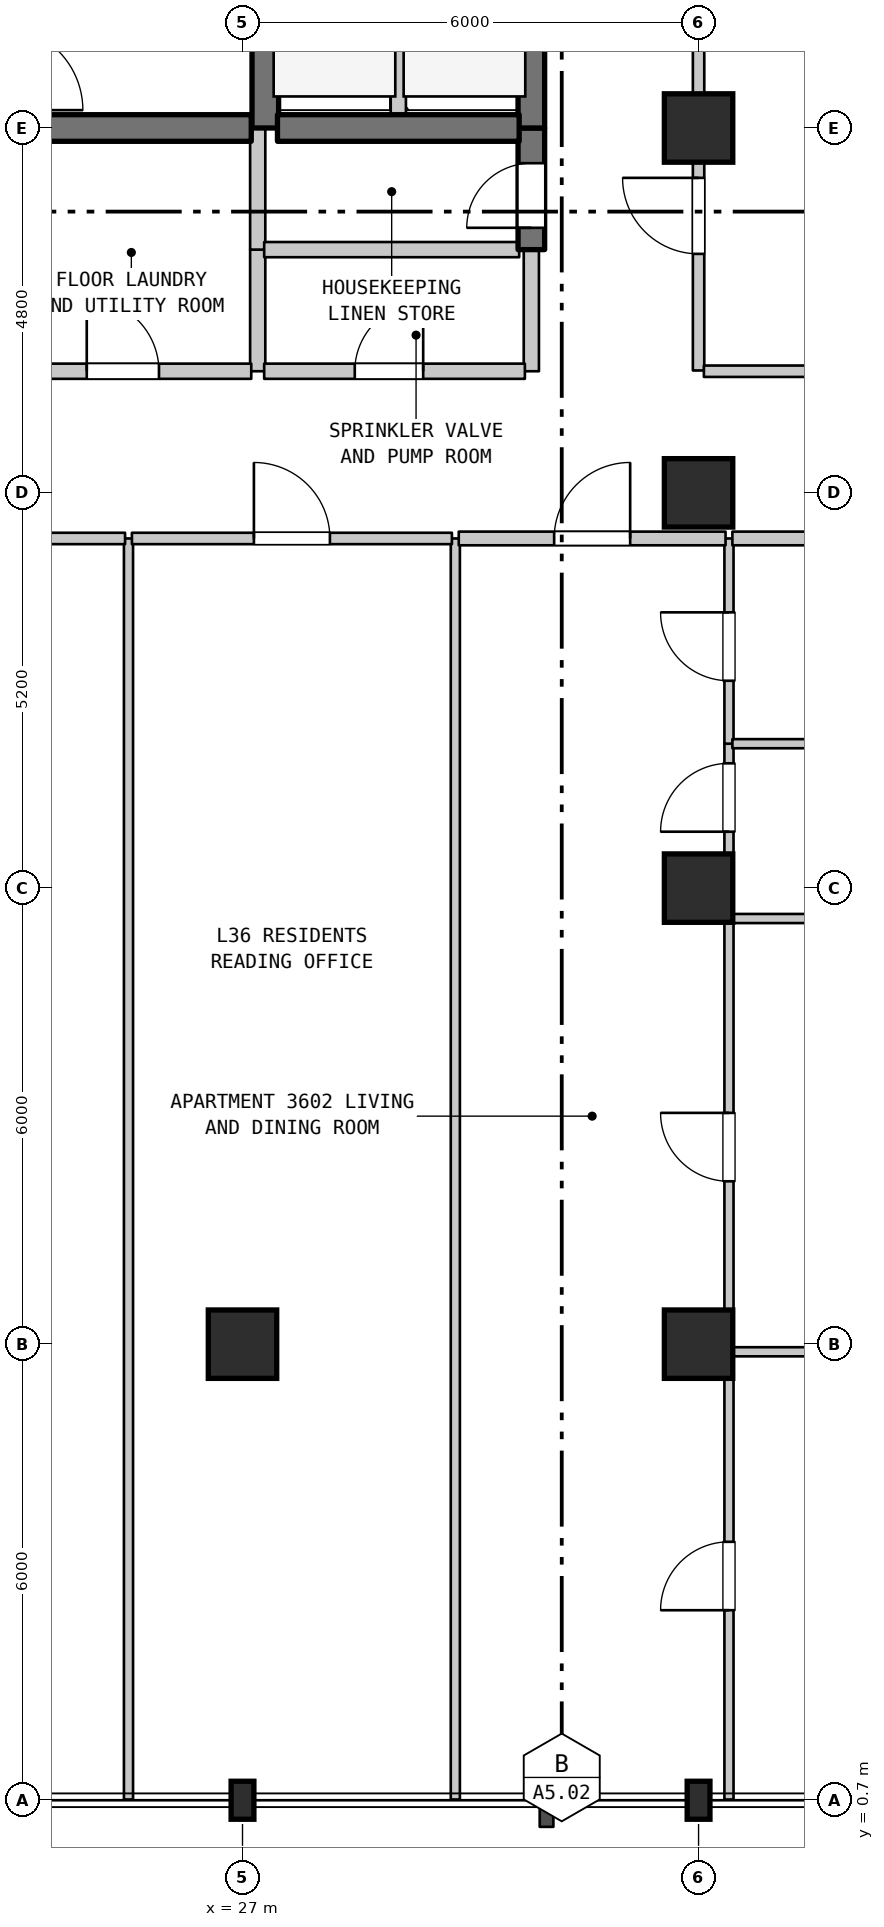
"""IFC4 building model, lengths in metres.
Left out: names, types, materials, properties, quantities, classifications, styles, units other than length and angle.
Written with IfcOpenShell. Run it as: python <this file> out.ifc"""

import sys

from ifc_helpers import new_model, si_unit, direction, frame, frame_2d, origin, origin_2d, place, context, subcontext, project, spatial, rectangle, i_section, extrude, element, fill, save


model = new_model("IFC4")
c1 = context("Model", 3, precision=1e-05, world=origin(), true_north=direction((0.0, 1.0)))
c2 = subcontext(c1, "Body", "Model", "MODEL_VIEW")
j1 = project(units=[si_unit("LENGTHUNIT", "METRE"), si_unit("PLANEANGLEUNIT", "RADIAN")], contexts=[c1])
p1 = place(None, origin())
s1 = spatial("IfcSite", under=j1, at=p1, CompositionType="ELEMENT")
p2 = place(p1, origin())
s2 = spatial("IfcBuilding", under=s1, at=p2, CompositionType="ELEMENT")
p3 = place(p2, frame((0.0, 0.0, 148.3)))
s3 = spatial("IfcBuildingStorey", under=s2, at=p3, CompositionType="ELEMENT", Elevation=148.3)
p4 = place(p3, frame((27.0, 0.7, 0.0), z_axis=(0.0, 0.0, 1.0), x_axis=(1.0, 0.0, 0.0)))
e1 = element("IfcColumn", 1, at=p4, inside=s3, PredefinedType="COLUMN", context=c2, shape_type="SweptSolid", body=[
    extrude(i_section(OverallWidth=0.3, OverallDepth=0.5, WebThickness=0.014, FlangeThickness=0.028, FilletRadius=0.027, at=origin_2d()), origin(), (0.0, 0.0, 1.0), 3.7),
])
p5 = place(p3, frame((27.0, 6.7, 0.0), z_axis=(0.0, 0.0, 1.0), x_axis=(1.0, 0.0, 0.0)))
e2 = element("IfcColumn", 2, at=p5, inside=s3, PredefinedType="COLUMN", context=c2, shape_type="SweptSolid", body=[
    extrude(rectangle(XDim=0.9, YDim=0.9, at=origin_2d()), origin(), (0.0, 0.0, 1.0), 3.7),
])
p6 = place(p3, frame((33.0, 0.7, 0.0), z_axis=(0.0, 0.0, 1.0), x_axis=(1.0, 0.0, 0.0)))
e3 = element("IfcColumn", 3, at=p6, inside=s3, PredefinedType="COLUMN", context=c2, shape_type="SweptSolid", body=[
    extrude(i_section(OverallWidth=0.3, OverallDepth=0.5, WebThickness=0.014, FlangeThickness=0.028, FilletRadius=0.027, at=origin_2d()), origin(), (0.0, 0.0, 1.0), 3.7),
])
for number, where, z_axis, x_axis in (
    (4, (33.0, 6.7, 0.0), (0.0, 0.0, 1.0), (1.0, 0.0, 0.0)),
    (5, (33.0, 12.7, 0.0), (0.0, 0.0, 1.0), (1.0, 0.0, 0.0)),
    (6, (33.0, 17.9, 0.0), (0.0, 0.0, 1.0), (1.0, 0.0, 0.0)),
    (7, (33.0, 22.7, 0.0), (0.0, 0.0, 1.0), (1.0, 0.0, 0.0)),
):
    element("IfcColumn", number, at=place(p3, frame(where, z_axis=z_axis, x_axis=x_axis)), inside=s3, PredefinedType="COLUMN", context=c2, shape_type="SweptSolid", body=[
        extrude(rectangle(XDim=0.9, YDim=0.9, at=origin_2d()), origin(), (0.0, 0.0, 1.0), 3.7),
    ])
p7 = place(p3, frame((25.5, 0.71, 0.0), z_axis=(0.0, 0.0, 1.0), x_axis=(0.0, 1.0, 0.0)))
e8 = element("IfcWall", 8, at=p7, inside=s3, PredefinedType="PARTITIONING", context=c2, shape_type="SweptSolid", body=[
    extrude(rectangle(XDim=16.59, YDim=0.12, at=frame_2d((8.295, 0.0))), origin(), (0.0, 0.0, 1.0), 3.385),
])
p8 = place(p3, frame((27.2, 19.5, 0.0), z_axis=(0.0, 0.0, 1.0), x_axis=(0.0, 1.0, 0.0)))
e9 = element("IfcWall", 9, at=p8, inside=s3, PredefinedType="STANDARD", context=c2, shape_type="SweptSolid", body=[
    extrude(rectangle(XDim=1.6, YDim=0.2, at=frame_2d((0.8, 0.0))), origin(), (0.0, 0.0, 1.0), 3.385),
])
p9 = place(p3, frame((27.2, 21.1, 0.0), z_axis=(0.0, 0.0, 1.0), x_axis=(0.0, 1.0, 0.0)))
e10 = element("IfcWall", 10, at=p9, inside=s3, PredefinedType="STANDARD", context=c2, shape_type="SweptSolid", body=[
    extrude(rectangle(XDim=1.6, YDim=0.2, at=frame_2d((0.8, 0.0))), origin(), (0.0, 0.0, 1.0), 3.385),
])
p10 = place(p3, frame((27.3, 22.7, 0.0), z_axis=(0.0, 0.0, 1.0), x_axis=(0.0, 1.0, 0.0)))
e11 = element("IfcWall", 11, at=p10, inside=s3, PredefinedType="SHEAR", context=c2, shape_type="SweptSolid", body=[
    extrude(rectangle(XDim=2.9, YDim=0.35, at=frame_2d((1.45, 0.0))), origin(), (0.0, 0.0, 1.0), 3.385),
])
p11 = place(p3, frame((29.05, 22.7, 0.0), z_axis=(0.0, 0.0, 1.0), x_axis=(0.0, 1.0, 0.0)))
e12 = element("IfcWall", 12, at=p11, inside=s3, PredefinedType="STANDARD", context=c2, shape_type="SweptSolid", body=[
    extrude(rectangle(XDim=2.9, YDim=0.2, at=frame_2d((1.45, 0.0))), origin(), (0.0, 0.0, 1.0), 3.385),
])
p12 = place(p3, frame((29.8, 0.71, 0.0), z_axis=(0.0, 0.0, 1.0), x_axis=(0.0, 1.0, 0.0)))
e13 = element("IfcWall", 13, at=p12, inside=s3, PredefinedType="PARTITIONING", context=c2, shape_type="SweptSolid", body=[
    extrude(rectangle(XDim=16.59, YDim=0.12, at=frame_2d((8.295, 0.0))), origin(), (0.0, 0.0, 1.0), 3.385),
])
p13 = place(p3, frame((30.8, 19.5, 0.0), z_axis=(0.0, 0.0, 1.0), x_axis=(0.0, 1.0, 0.0)))
e14 = element("IfcWall", 14, at=p13, inside=s3, PredefinedType="STANDARD", context=c2, shape_type="SweptSolid", body=[
    extrude(rectangle(XDim=1.6, YDim=0.2, at=frame_2d((0.8, 0.0))), origin(), (0.0, 0.0, 1.0), 3.385),
])
p14 = place(p3, frame((30.8, 21.1, 0.0), z_axis=(0.0, 0.0, 1.0), x_axis=(0.0, 1.0, 0.0)))
e15 = element("IfcWall", 15, at=p14, inside=s3, PredefinedType="SHEAR", context=c2, shape_type="SweptSolid", body=[
    extrude(rectangle(XDim=1.6, YDim=0.35, at=frame_2d((0.8, 0.0))), origin(), (0.0, 0.0, 1.0), 3.385),
])
p15 = place(p14, frame((0.287, 0.0, 0.0)))
e16 = element("IfcOpeningElement", 16, at=p15, cuts=e15, PredefinedType="OPENING", context=c2, shape_type="SweptSolid", body=[
    extrude(rectangle(XDim=0.85, YDim=2.1, at=frame_2d((0.425, 1.05))), frame((0.0, 0.185, 0.0), z_axis=(0.0, -1.0, 0.0), x_axis=(1.0, 0.0, 0.0)), (0.0, 0.0, 1.0), 0.37),
])
p16 = place(p3, frame((30.8, 22.7, 0.0), z_axis=(0.0, 0.0, 1.0), x_axis=(0.0, 1.0, 0.0)))
e17 = element("IfcWall", 17, at=p16, inside=s3, PredefinedType="SHEAR", context=c2, shape_type="SweptSolid", body=[
    extrude(rectangle(XDim=2.9, YDim=0.35, at=frame_2d((1.45, 0.0))), origin(), (0.0, 0.0, 1.0), 3.385),
])
p17 = place(p3, frame((33.0, 19.51, 0.0), z_axis=(0.0, 0.0, 1.0), x_axis=(0.0, 1.0, 0.0)))
e18 = element("IfcWall", 18, at=p17, inside=s3, PredefinedType="STANDARD", context=c2, shape_type="SweptSolid", body=[
    extrude(rectangle(XDim=5.35, YDim=0.15, at=frame_2d((2.675, 0.0))), origin(), (0.0, 0.0, 1.0), 2.935),
])
p18 = place(p17, frame((1.534, 0.0, 0.0)))
e19 = element("IfcOpeningElement", 19, at=p18, cuts=e18, PredefinedType="OPENING", context=c2, shape_type="SweptSolid", body=[
    extrude(rectangle(XDim=1.0, YDim=2.15, at=frame_2d((0.5, 1.075))), frame((0.0, 0.085, 0.0), z_axis=(0.0, -1.0, 0.0), x_axis=(1.0, 0.0, 0.0)), (0.0, 0.0, 1.0), 0.17),
])
p19 = place(p3, frame((33.4, 0.71, 0.0), z_axis=(0.0, 0.0, 1.0), x_axis=(0.0, 1.0, 0.0)))
e20 = element("IfcWall", 20, at=p19, inside=s3, PredefinedType="PARTITIONING", context=c2, shape_type="SweptSolid", body=[
    extrude(rectangle(XDim=11.59, YDim=0.12, at=frame_2d((5.795, 0.0))), origin(), (0.0, 0.0, 1.0), 3.385),
])
p20 = place(p19, frame((2.49, 0.0, 0.0)))
e21 = element("IfcOpeningElement", 21, at=p20, cuts=e20, PredefinedType="OPENING", context=c2, shape_type="SweptSolid", body=[
    extrude(rectangle(XDim=0.9, YDim=2.15, at=frame_2d((0.45, 1.075))), frame((0.0, 0.07, 0.0), z_axis=(0.0, -1.0, 0.0), x_axis=(1.0, 0.0, 0.0)), (0.0, 0.0, 1.0), 0.14),
])
p21 = place(p19, frame((8.133, 0.0, 0.0)))
e22 = element("IfcOpeningElement", 22, at=p21, cuts=e20, PredefinedType="OPENING", context=c2, shape_type="SweptSolid", body=[
    extrude(rectangle(XDim=0.9, YDim=2.15, at=frame_2d((0.45, 1.075))), frame((0.0, 0.07, 0.0), z_axis=(0.0, -1.0, 0.0), x_axis=(1.0, 0.0, 0.0)), (0.0, 0.0, 1.0), 0.14),
])
p22 = place(p3, frame((33.4, 12.3, 0.0), z_axis=(0.0, 0.0, 1.0), x_axis=(0.0, 1.0, 0.0)))
e23 = element("IfcWall", 23, at=p22, inside=s3, PredefinedType="PARTITIONING", context=c2, shape_type="SweptSolid", body=[
    extrude(rectangle(XDim=2.3, YDim=0.12, at=frame_2d((1.15, 0.0))), origin(), (0.0, 0.0, 1.0), 3.385),
])
p23 = place(p22, frame((1.142, 0.0, 0.0)))
e24 = element("IfcOpeningElement", 24, at=p23, cuts=e23, PredefinedType="OPENING", context=c2, shape_type="SweptSolid", body=[
    extrude(rectangle(XDim=0.9, YDim=2.15, at=frame_2d((0.45, 1.075))), frame((0.0, 0.07, 0.0), z_axis=(0.0, -1.0, 0.0), x_axis=(1.0, 0.0, 0.0)), (0.0, 0.0, 1.0), 0.14),
])
p24 = place(p3, frame((33.4, 14.6, 0.0), z_axis=(0.0, 0.0, 1.0), x_axis=(0.0, 1.0, 0.0)))
e25 = element("IfcWall", 25, at=p24, inside=s3, PredefinedType="PARTITIONING", context=c2, shape_type="SweptSolid", body=[
    extrude(rectangle(XDim=2.7, YDim=0.12, at=frame_2d((1.35, 0.0))), origin(), (0.0, 0.0, 1.0), 3.385),
])
p25 = place(p24, frame((0.828, 0.0, 0.0)))
e26 = element("IfcOpeningElement", 26, at=p25, cuts=e25, PredefinedType="OPENING", context=c2, shape_type="SweptSolid", body=[
    extrude(rectangle(XDim=0.9, YDim=2.1, at=frame_2d((0.45, 1.05))), frame((0.0, 0.07, 0.0), z_axis=(0.0, -1.0, 0.0), x_axis=(1.0, 0.0, 0.0)), (0.0, 0.0, 1.0), 0.14),
])
p26 = place(p3, frame((33.445, 6.6, 0.0), z_axis=(0.0, 0.0, 1.0), x_axis=(1.0, 0.0, 0.0)))
e27 = element("IfcWall", 27, at=p26, inside=s3, PredefinedType="PARTITIONING", context=c2, shape_type="SweptSolid", body=[
    extrude(rectangle(XDim=4.69, YDim=0.12, at=frame_2d((2.345, 0.0))), origin(), (0.0, 0.0, 1.0), 2.935),
])
for number, where, z_axis, x_axis in (
    (28, (33.445, 12.3, 0.0), (0.0, 0.0, 1.0), (1.0, 0.0, 0.0)),
    (29, (33.445, 14.6, 0.0), (0.0, 0.0, 1.0), (1.0, 0.0, 0.0)),
):
    element("IfcWall", number, at=place(p3, frame(where, z_axis=z_axis, x_axis=x_axis)), inside=s3, PredefinedType="PARTITIONING", context=c2, shape_type="SweptSolid", body=[
        extrude(rectangle(XDim=4.69, YDim=0.12, at=frame_2d((2.345, 0.0))), origin(), (0.0, 0.0, 1.0), 3.385),
    ])
p27 = place(p3, frame((20.545, 17.3, 0.0), z_axis=(0.0, 0.0, 1.0), x_axis=(1.0, 0.0, 0.0)))
e30 = element("IfcWall", 30, at=p27, inside=s3, PredefinedType="STANDARD", context=c2, shape_type="SweptSolid", body=[
    extrude(rectangle(XDim=4.91, YDim=0.15, at=frame_2d((2.455, 0.0))), origin(), (0.0, 0.0, 1.0), 3.385),
])
p28 = place(p27, frame((1.884, 0.0, 0.0)))
e31 = element("IfcOpeningElement", 31, at=p28, cuts=e30, PredefinedType="OPENING", context=c2, shape_type="SweptSolid", body=[
    extrude(rectangle(XDim=1.0, YDim=2.15, at=frame_2d((0.5, 1.075))), frame((0.0, 0.085, 0.0), z_axis=(0.0, -1.0, 0.0), x_axis=(1.0, 0.0, 0.0)), (0.0, 0.0, 1.0), 0.17),
])
p29 = place(p3, frame((25.545, 17.3, 0.0), z_axis=(0.0, 0.0, 1.0), x_axis=(1.0, 0.0, 0.0)))
e32 = element("IfcWall", 32, at=p29, inside=s3, PredefinedType="STANDARD", context=c2, shape_type="SweptSolid", body=[
    extrude(rectangle(XDim=4.21, YDim=0.15, at=frame_2d((2.105, 0.0))), origin(), (0.0, 0.0, 1.0), 3.385),
])
p30 = place(p29, frame((1.605, 0.0, 0.0)))
e33 = element("IfcOpeningElement", 33, at=p30, cuts=e32, PredefinedType="OPENING", context=c2, shape_type="SweptSolid", body=[
    extrude(rectangle(XDim=1.0, YDim=2.15, at=frame_2d((0.5, 1.075))), frame((0.0, 0.085, 0.0), z_axis=(0.0, -1.0, 0.0), x_axis=(1.0, 0.0, 0.0)), (0.0, 0.0, 1.0), 0.17),
])
p31 = place(p3, frame((29.845, 17.3, 0.0), z_axis=(0.0, 0.0, 1.0), x_axis=(1.0, 0.0, 0.0)))
e34 = element("IfcWall", 34, at=p31, inside=s3, PredefinedType="STANDARD", context=c2, shape_type="SweptSolid", body=[
    extrude(rectangle(XDim=3.51, YDim=0.18, at=frame_2d((1.755, 0.0))), origin(), (0.0, 0.0, 1.0), 3.385),
])
p32 = place(p31, frame((1.255, 0.0, 0.0)))
e35 = element("IfcOpeningElement", 35, at=p32, cuts=e34, PredefinedType="OPENING", context=c2, shape_type="SweptSolid", body=[
    extrude(rectangle(XDim=1.0, YDim=2.15, at=frame_2d((0.5, 1.075))), frame((0.0, 0.1, 0.0), z_axis=(0.0, -1.0, 0.0), x_axis=(1.0, 0.0, 0.0)), (0.0, 0.0, 1.0), 0.2),
])
p33 = place(p3, frame((33.445, 17.3, 0.0), z_axis=(0.0, 0.0, 1.0), x_axis=(1.0, 0.0, 0.0)))
e36 = element("IfcWall", 36, at=p33, inside=s3, PredefinedType="STANDARD", context=c2, shape_type="SweptSolid", body=[
    extrude(rectangle(XDim=4.69, YDim=0.18, at=frame_2d((2.345, 0.0))), origin(), (0.0, 0.0, 1.0), 3.385),
])
p34 = place(p3, frame((23.96, 19.5, 0.0), z_axis=(0.0, 0.0, 1.0), x_axis=(1.0, 0.0, 0.0)))
e37 = element("IfcWall", 37, at=p34, inside=s3, PredefinedType="STANDARD", context=c2, shape_type="SweptSolid", body=[
    extrude(rectangle(XDim=3.155, YDim=0.2, at=frame_2d((1.578, 0.0))), origin(), (0.0, 0.0, 1.0), 3.385),
])
p35 = place(p34, frame((0.991, 0.0, 0.0)))
e38 = element("IfcOpeningElement", 38, at=p35, cuts=e37, PredefinedType="OPENING", context=c2, shape_type="SweptSolid", body=[
    extrude(rectangle(XDim=0.95, YDim=2.15, at=frame_2d((0.475, 1.075))), frame((0.0, 0.11, 0.0), z_axis=(0.0, -1.0, 0.0), x_axis=(1.0, 0.0, 0.0)), (0.0, 0.0, 1.0), 0.22),
])
p36 = place(p3, frame((27.285, 19.5, 0.0), z_axis=(0.0, 0.0, 1.0), x_axis=(1.0, 0.0, 0.0)))
e39 = element("IfcWall", 39, at=p36, inside=s3, PredefinedType="STANDARD", context=c2, shape_type="SweptSolid", body=[
    extrude(rectangle(XDim=3.43, YDim=0.2, at=frame_2d((1.715, 0.0))), origin(), (0.0, 0.0, 1.0), 3.385),
])
p37 = place(p36, frame((1.192, 0.0, 0.0)))
e40 = element("IfcOpeningElement", 40, at=p37, cuts=e39, PredefinedType="OPENING", context=c2, shape_type="SweptSolid", body=[
    extrude(rectangle(XDim=0.9, YDim=2.15, at=frame_2d((0.45, 1.075))), frame((0.0, 0.11, 0.0), z_axis=(0.0, -1.0, 0.0), x_axis=(1.0, 0.0, 0.0)), (0.0, 0.0, 1.0), 0.22),
])
p38 = place(p3, frame((33.07, 19.5, 0.0), z_axis=(0.0, 0.0, 1.0), x_axis=(1.0, 0.0, 0.0)))
e41 = element("IfcWall", 41, at=p38, inside=s3, PredefinedType="STANDARD", context=c2, shape_type="SweptSolid", body=[
    extrude(rectangle(XDim=21.51, YDim=0.15, at=frame_2d((10.755, 0.0))), origin(), (0.0, 0.0, 1.0), 3.385),
])
p39 = place(p38, frame((10.185, 0.0, 0.0)))
e42 = element("IfcOpeningElement", 42, at=p39, cuts=e41, PredefinedType="OPENING", context=c2, shape_type="SweptSolid", body=[
    extrude(rectangle(XDim=1.0, YDim=2.15, at=frame_2d((0.5, 1.075))), frame((0.0, 0.085, 0.0), z_axis=(0.0, -1.0, 0.0), x_axis=(1.0, 0.0, 0.0)), (0.0, 0.0, 1.0), 0.17),
])
p40 = place(p3, frame((27.285, 21.1, 0.0), z_axis=(0.0, 0.0, 1.0), x_axis=(1.0, 0.0, 0.0)))
e43 = element("IfcWall", 43, at=p40, inside=s3, PredefinedType="STANDARD", context=c2, shape_type="SweptSolid", body=[
    extrude(rectangle(XDim=3.355, YDim=0.2, at=frame_2d((1.677, 0.0))), origin(), (0.0, 0.0, 1.0), 3.385),
])
p41 = place(p3, frame((23.96, 22.7, 0.0), z_axis=(0.0, 0.0, 1.0), x_axis=(1.0, 0.0, 0.0)))
e44 = element("IfcWall", 44, at=p41, inside=s3, PredefinedType="SHEAR", context=c2, shape_type="SweptSolid", body=[
    extrude(rectangle(XDim=3.155, YDim=0.35, at=frame_2d((1.578, 0.0))), origin(), (0.0, 0.0, 1.0), 3.385),
])
p42 = place(p3, frame((27.46, 22.7, 0.0), z_axis=(0.0, 0.0, 1.0), x_axis=(1.0, 0.0, 0.0)))
e45 = element("IfcWall", 45, at=p42, inside=s3, PredefinedType="SHEAR", context=c2, shape_type="SweptSolid", body=[
    extrude(rectangle(XDim=3.18, YDim=0.35, at=frame_2d((1.59, 0.0))), origin(), (0.0, 0.0, 1.0), 3.385),
])
p43 = place(p15, origin())
e46 = element("IfcDoor", 46, at=p43, inside=s3, OperationType="SINGLE_SWING_LEFT", PredefinedType="DOOR", context=c2, shape_type="SweptSolid", body=[
    extrude(rectangle(XDim=0.85, YDim=2.1, at=frame_2d((0.425, 1.05))), frame((0.0, 0.025, 0.0), z_axis=(0.0, -1.0, 0.0), x_axis=(1.0, 0.0, 0.0)), (0.0, 0.0, 1.0), 0.05),
])
fill(e16, e46)
p44 = place(p18, origin())
e47 = element("IfcDoor", 47, at=p44, inside=s3, OperationType="SINGLE_SWING_RIGHT", PredefinedType="DOOR", context=c2, shape_type="SweptSolid", body=[
    extrude(rectangle(XDim=1.0, YDim=2.15, at=frame_2d((0.5, 1.075))), frame((0.0, 0.025, 0.0), z_axis=(0.0, -1.0, 0.0), x_axis=(1.0, 0.0, 0.0)), (0.0, 0.0, 1.0), 0.05),
])
fill(e19, e47)
p45 = place(p20, origin())
e48 = element("IfcDoor", 48, at=p45, inside=s3, OperationType="SINGLE_SWING_LEFT", PredefinedType="DOOR", context=c2, shape_type="SweptSolid", body=[
    extrude(rectangle(XDim=0.9, YDim=2.15, at=frame_2d((0.45, 1.075))), frame((0.0, 0.025, 0.0), z_axis=(0.0, -1.0, 0.0), x_axis=(1.0, 0.0, 0.0)), (0.0, 0.0, 1.0), 0.05),
])
fill(e21, e48)
p46 = place(p21, origin())
e49 = element("IfcDoor", 49, at=p46, inside=s3, OperationType="SINGLE_SWING_RIGHT", PredefinedType="DOOR", context=c2, shape_type="SweptSolid", body=[
    extrude(rectangle(XDim=0.9, YDim=2.15, at=frame_2d((0.45, 1.075))), frame((0.0, 0.025, 0.0), z_axis=(0.0, -1.0, 0.0), x_axis=(1.0, 0.0, 0.0)), (0.0, 0.0, 1.0), 0.05),
])
fill(e22, e49)
p47 = place(p23, origin())
e50 = element("IfcDoor", 50, at=p47, inside=s3, OperationType="SINGLE_SWING_LEFT", PredefinedType="DOOR", context=c2, shape_type="SweptSolid", body=[
    extrude(rectangle(XDim=0.9, YDim=2.15, at=frame_2d((0.45, 1.075))), frame((0.0, 0.025, 0.0), z_axis=(0.0, -1.0, 0.0), x_axis=(1.0, 0.0, 0.0)), (0.0, 0.0, 1.0), 0.05),
])
fill(e24, e50)
p48 = place(p25, origin())
e51 = element("IfcDoor", 51, at=p48, inside=s3, OperationType="SINGLE_SWING_RIGHT", PredefinedType="DOOR", context=c2, shape_type="SweptSolid", body=[
    extrude(rectangle(XDim=0.9, YDim=2.1, at=frame_2d((0.45, 1.05))), frame((0.0, 0.025, 0.0), z_axis=(0.0, -1.0, 0.0), x_axis=(1.0, 0.0, 0.0)), (0.0, 0.0, 1.0), 0.05),
])
fill(e26, e51)
p49 = place(p30, origin())
e52 = element("IfcDoor", 52, at=p49, inside=s3, OperationType="SINGLE_SWING_LEFT", PredefinedType="DOOR", context=c2, shape_type="SweptSolid", body=[
    extrude(rectangle(XDim=1.0, YDim=2.15, at=frame_2d((0.5, 1.075))), frame((0.0, 0.025, 0.0), z_axis=(0.0, -1.0, 0.0), x_axis=(1.0, 0.0, 0.0)), (0.0, 0.0, 1.0), 0.05),
])
fill(e33, e52)
p50 = place(p32, origin())
e53 = element("IfcDoor", 53, at=p50, inside=s3, OperationType="SINGLE_SWING_RIGHT", PredefinedType="DOOR", context=c2, shape_type="SweptSolid", body=[
    extrude(rectangle(XDim=1.0, YDim=2.15, at=frame_2d((0.5, 1.075))), frame((0.0, 0.025, 0.0), z_axis=(0.0, -1.0, 0.0), x_axis=(1.0, 0.0, 0.0)), (0.0, 0.0, 1.0), 0.05),
])
fill(e35, e53)
p51 = place(p35, origin())
e54 = element("IfcDoor", 54, at=p51, inside=s3, OperationType="SINGLE_SWING_LEFT", PredefinedType="DOOR", context=c2, shape_type="SweptSolid", body=[
    extrude(rectangle(XDim=0.95, YDim=2.15, at=frame_2d((0.475, 1.075))), frame((0.0, 0.025, 0.0), z_axis=(0.0, -1.0, 0.0), x_axis=(1.0, 0.0, 0.0)), (0.0, 0.0, 1.0), 0.05),
])
fill(e38, e54)
p52 = place(p37, origin())
e55 = element("IfcDoor", 55, at=p52, inside=s3, OperationType="SINGLE_SWING_RIGHT", PredefinedType="DOOR", context=c2, shape_type="SweptSolid", body=[
    extrude(rectangle(XDim=0.9, YDim=2.15, at=frame_2d((0.45, 1.075))), frame((0.0, 0.025, 0.0), z_axis=(0.0, -1.0, 0.0), x_axis=(1.0, 0.0, 0.0)), (0.0, 0.0, 1.0), 0.05),
])
fill(e40, e55)
save(model, sys.argv[1])
